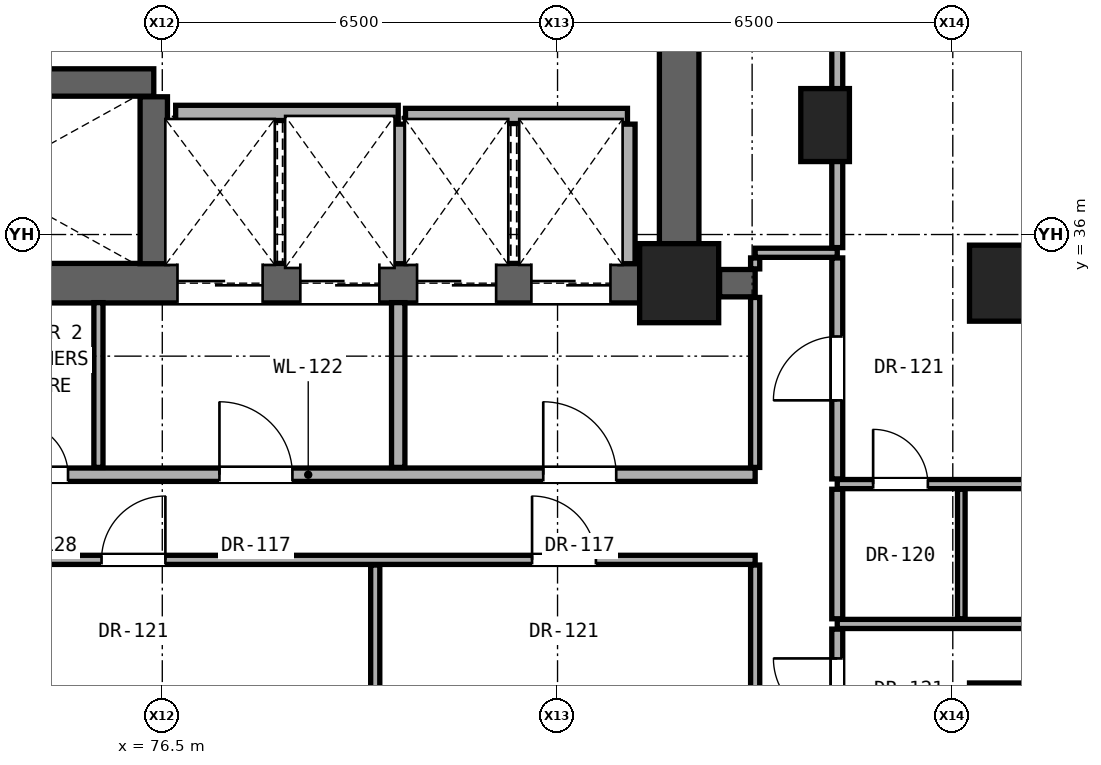
"""IFC4 building model, lengths in metres.
Left out: names, types, materials, properties, quantities, classifications, styles, units other than length and angle.
Written with IfcOpenShell. Run it as: python <this file> out.ifc"""

import sys

from ifc_helpers import new_model, si_unit, direction, frame, frame_2d, origin, origin_2d, place, context, subcontext, project, spatial, rectangle, hollow_rectangle, extrude, element, fill, save


model = new_model("IFC4")
c1 = context("Model", 3, precision=1e-05, world=origin(), true_north=direction((0.0, 1.0)))
c2 = subcontext(c1, "Body", "Model", "MODEL_VIEW")
j1 = project(units=[si_unit("LENGTHUNIT", "METRE"), si_unit("PLANEANGLEUNIT", "RADIAN")], contexts=[c1])
p1 = place(None, origin())
s1 = spatial("IfcSite", under=j1, at=p1, CompositionType="ELEMENT")
p2 = place(p1, origin())
s2 = spatial("IfcBuilding", under=s1, at=p2, CompositionType="ELEMENT")
p3 = place(p2, frame((0.0, 0.0, 78.5)))
s3 = spatial("IfcBuildingStorey", under=s2, at=p3, CompositionType="ELEMENT", Elevation=78.5)
p4 = place(p3, frame((85.0, 35.2, 0.0), z_axis=(0.0, 0.0, 1.0), x_axis=(1.0, 0.0, 0.0)))
e1 = element("IfcColumn", 1, at=p4, inside=s3, PredefinedType="COLUMN", context=c2, shape_type="SweptSolid", body=[
    extrude(rectangle(XDim=1.3, YDim=1.3, at=origin_2d()), origin(), (0.0, 0.0, 1.0), 3.3),
])
for number, where, z_axis, x_axis in (
    (2, (90.4, 28.0, 0.0), (0.0, 0.0, 1.0), (1.0, 0.0, 0.0)),
    (3, (90.4, 35.2, 0.0), (0.0, 0.0, 1.0), (1.0, 0.0, 0.0)),
):
    element("IfcColumn", number, at=place(p3, frame(where, z_axis=z_axis, x_axis=x_axis)), inside=s3, PredefinedType="COLUMN", context=c2, shape_type="SweptSolid", body=[
        extrude(hollow_rectangle(XDim=1.25, YDim=1.25, WallThickness=0.07, at=origin_2d()), origin(), (0.0, 0.0, 1.0), 3.3),
    ])
p5 = place(p3, frame((87.4, 37.8, 0.0), z_axis=(0.0, 0.0, 1.0), x_axis=(1.0, 0.0, 0.0)))
e4 = element("IfcColumn", 4, at=p5, inside=s3, PredefinedType="PILASTER", context=c2, shape_type="SweptSolid", body=[
    extrude(rectangle(XDim=0.8, YDim=1.2, at=origin_2d()), origin(), (0.0, 0.0, 1.0), 3.3),
])
p6 = place(p3, frame((85.0, 35.2, 0.0), z_axis=(0.0, 0.0, 1.0), x_axis=(0.0, 1.0, 0.0)))
e5 = element("IfcWall", 5, at=p6, inside=s3, PredefinedType="SHEAR", context=c2, shape_type="SweptSolid", body=[
    extrude(rectangle(XDim=5.6, YDim=0.65, at=frame_2d((2.8, 0.0))), origin(), (0.0, 0.0, 1.0), 2.94),
])
p7 = place(p3, frame((68.0, 35.2, 0.0), z_axis=(0.0, 0.0, 1.0), x_axis=(1.0, 0.0, 0.0)))
e6 = element("IfcWall", 6, at=p7, inside=s3, PredefinedType="SHEAR", context=c2, shape_type="SweptSolid", body=[
    extrude(rectangle(XDim=17.0, YDim=0.65, at=frame_2d((8.5, 0.0))), origin(), (0.0, 0.0, 1.0), 2.94),
])
p8 = place(p7, frame((1.06, 0.0, 0.0)))
e7 = element("IfcOpeningElement", 7, at=p8, cuts=e6, PredefinedType="OPENING", context=c2, shape_type="SweptSolid", body=[
    extrude(rectangle(XDim=1.15, YDim=2.2, at=frame_2d((0.575, 1.1))), frame((0.0, 0.335, 0.0), z_axis=(0.0, -1.0, 0.0), x_axis=(1.0, 0.0, 0.0)), (0.0, 0.0, 1.0), 0.67),
])
p9 = place(p7, frame((8.75, 0.0, 0.0)))
e8 = element("IfcOpeningElement", 8, at=p9, cuts=e6, PredefinedType="OPENING", context=c2, shape_type="SweptSolid", body=[
    extrude(rectangle(XDim=1.4, YDim=2.35, at=frame_2d((0.7, 1.175))), frame((0.0, 0.335, 0.0), z_axis=(0.0, -1.0, 0.0), x_axis=(1.0, 0.0, 0.0)), (0.0, 0.0, 1.0), 0.67),
])
p10 = place(p7, frame((10.77, 0.0, 0.0)))
e9 = element("IfcOpeningElement", 9, at=p10, cuts=e6, PredefinedType="OPENING", context=c2, shape_type="SweptSolid", body=[
    extrude(rectangle(XDim=1.3, YDim=2.3, at=frame_2d((0.65, 1.15))), frame((0.0, 0.335, 0.0), z_axis=(0.0, -1.0, 0.0), x_axis=(1.0, 0.0, 0.0)), (0.0, 0.0, 1.0), 0.67),
])
p11 = place(p7, frame((12.69, 0.0, 0.0)))
e10 = element("IfcOpeningElement", 10, at=p11, cuts=e6, PredefinedType="OPENING", context=c2, shape_type="SweptSolid", body=[
    extrude(rectangle(XDim=1.3, YDim=2.3, at=frame_2d((0.65, 1.15))), frame((0.0, 0.335, 0.0), z_axis=(0.0, -1.0, 0.0), x_axis=(1.0, 0.0, 0.0)), (0.0, 0.0, 1.0), 0.67),
])
p12 = place(p7, frame((14.57, 0.0, 0.0)))
e11 = element("IfcOpeningElement", 11, at=p12, cuts=e6, PredefinedType="OPENING", context=c2, shape_type="SweptSolid", body=[
    extrude(rectangle(XDim=1.3, YDim=2.3, at=frame_2d((0.65, 1.15))), frame((0.0, 0.335, 0.0), z_axis=(0.0, -1.0, 0.0), x_axis=(1.0, 0.0, 0.0)), (0.0, 0.0, 1.0), 0.67),
])
p13 = place(p3, frame((87.6, 29.596, 0.0), z_axis=(0.0, 0.0, 1.0), x_axis=(1.0, 0.0, 0.0)))
e12 = element("IfcWall", 12, at=p13, inside=s3, PredefinedType="PARTITIONING", context=c2, shape_type="SweptSolid", body=[
    extrude(rectangle(XDim=8.244, YDim=0.15, at=frame_2d((4.122, 0.0))), origin(), (0.0, 0.0, 1.0), 2.159),
])
p14 = place(p3, frame((66.62, 30.65, 0.0), z_axis=(0.0, 0.0, 1.0), x_axis=(1.0, 0.0, 0.0)))
e13 = element("IfcWall", 13, at=p14, inside=s3, PredefinedType="PARTITIONING", context=c2, shape_type="SweptSolid", body=[
    extrude(rectangle(XDim=19.63, YDim=0.15, at=frame_2d((9.815, 0.0))), origin(), (0.0, 0.0, 1.0), 2.316),
])
p15 = place(p14, frame((3.805, 0.0, 0.0)))
e14 = element("IfcOpeningElement", 14, at=p15, cuts=e13, PredefinedType="OPENING", context=c2, shape_type="SweptSolid", body=[
    extrude(rectangle(XDim=0.95, YDim=2.15, at=frame_2d((0.475, 1.075))), frame((0.0, 0.085, 0.0), z_axis=(0.0, -1.0, 0.0), x_axis=(1.0, 0.0, 0.0)), (0.0, 0.0, 1.0), 0.17),
])
p16 = place(p14, frame((8.881, 0.0, 0.0)))
e15 = element("IfcOpeningElement", 15, at=p16, cuts=e13, PredefinedType="OPENING", context=c2, shape_type="SweptSolid", body=[
    extrude(rectangle(XDim=1.05, YDim=2.2, at=frame_2d((0.525, 1.1))), frame((0.0, 0.085, 0.0), z_axis=(0.0, -1.0, 0.0), x_axis=(1.0, 0.0, 0.0)), (0.0, 0.0, 1.0), 0.17),
])
p17 = place(p14, frame((15.961, 0.0, 0.0)))
e16 = element("IfcOpeningElement", 16, at=p17, cuts=e13, PredefinedType="OPENING", context=c2, shape_type="SweptSolid", body=[
    extrude(rectangle(XDim=1.05, YDim=2.2, at=frame_2d((0.525, 1.1))), frame((0.0, 0.085, 0.0), z_axis=(0.0, -1.0, 0.0), x_axis=(1.0, 0.0, 0.0)), (0.0, 0.0, 1.0), 0.17),
])
p18 = place(p3, frame((87.6, 31.896, 0.0), z_axis=(0.0, 0.0, 1.0), x_axis=(1.0, 0.0, 0.0)))
e17 = element("IfcWall", 17, at=p18, inside=s3, PredefinedType="PARTITIONING", context=c2, shape_type="SweptSolid", body=[
    extrude(rectangle(XDim=8.244, YDim=0.15, at=frame_2d((4.122, 0.0))), origin(), (0.0, 0.0, 1.0), 2.159),
])
p19 = place(p18, frame((4.697, 0.0, 0.0)))
e18 = element("IfcOpeningElement", 18, at=p19, cuts=e17, PredefinedType="OPENING", context=c2, shape_type="SweptSolid", body=[
    extrude(rectangle(XDim=0.85, YDim=2.01, at=frame_2d((0.425, 1.005))), frame((0.0, 0.085, 0.0), z_axis=(0.0, -1.0, 0.0), x_axis=(1.0, 0.0, 0.0)), (0.0, 0.0, 1.0), 0.17),
])
p20 = place(p18, frame((0.59, 0.0, 0.0)))
e19 = element("IfcOpeningElement", 19, at=p20, cuts=e17, PredefinedType="OPENING", context=c2, shape_type="SweptSolid", body=[
    extrude(rectangle(XDim=0.9, YDim=2.1, at=frame_2d((0.45, 1.05))), frame((0.0, 0.085, 0.0), z_axis=(0.0, -1.0, 0.0), x_axis=(1.0, 0.0, 0.0)), (0.0, 0.0, 1.0), 0.17),
])
p21 = place(p3, frame((71.55, 32.05, 0.0), z_axis=(0.0, 0.0, 1.0), x_axis=(1.0, 0.0, 0.0)))
e20 = element("IfcWall", 20, at=p21, inside=s3, PredefinedType="SOLIDWALL", context=c2, shape_type="SweptSolid", body=[
    extrude(rectangle(XDim=14.7, YDim=0.22, at=frame_2d((7.35, 0.0))), origin(), (0.0, 0.0, 1.0), 2.316),
])
p22 = place(p21, frame((11.215, 0.0, 0.0)))
e21 = element("IfcOpeningElement", 21, at=p22, cuts=e20, PredefinedType="OPENING", context=c2, shape_type="SweptSolid", body=[
    extrude(rectangle(XDim=1.2, YDim=2.25, at=frame_2d((0.6, 1.125))), frame((0.0, 0.12, 0.0), z_axis=(0.0, -1.0, 0.0), x_axis=(1.0, 0.0, 0.0)), (0.0, 0.0, 1.0), 0.24),
])
p23 = place(p21, frame((5.89, 0.0, 0.0)))
e22 = element("IfcOpeningElement", 22, at=p23, cuts=e20, PredefinedType="OPENING", context=c2, shape_type="SweptSolid", body=[
    extrude(rectangle(XDim=1.2, YDim=2.25, at=frame_2d((0.6, 1.125))), frame((0.0, 0.12, 0.0), z_axis=(0.0, -1.0, 0.0), x_axis=(1.0, 0.0, 0.0)), (0.0, 0.0, 1.0), 0.24),
])
p24 = place(p21, frame((0.7, 0.0, 0.0)))
e23 = element("IfcOpeningElement", 23, at=p24, cuts=e20, PredefinedType="OPENING", context=c2, shape_type="SweptSolid", body=[
    extrude(rectangle(XDim=0.85, YDim=2.01, at=frame_2d((0.425, 1.005))), frame((0.0, 0.12, 0.0), z_axis=(0.0, -1.0, 0.0), x_axis=(1.0, 0.0, 0.0)), (0.0, 0.0, 1.0), 0.24),
])
p25 = place(p21, frame((2.55, 0.0, 0.0)))
e24 = element("IfcOpeningElement", 24, at=p25, cuts=e20, PredefinedType="OPENING", context=c2, shape_type="SweptSolid", body=[
    extrude(rectangle(XDim=0.85, YDim=2.01, at=frame_2d((0.425, 1.005))), frame((0.0, 0.12, 0.0), z_axis=(0.0, -1.0, 0.0), x_axis=(1.0, 0.0, 0.0)), (0.0, 0.0, 1.0), 0.24),
])
p26 = place(p3, frame((85.665, 35.2, 0.0), z_axis=(0.0, 0.0, 1.0), x_axis=(1.0, 0.0, 0.0)))
e25 = element("IfcWall", 25, at=p26, inside=s3, PredefinedType="SHEAR", context=c2, shape_type="SweptSolid", body=[
    extrude(rectangle(XDim=0.585, YDim=0.45, at=frame_2d((0.292, 0.0))), origin(), (0.0, 0.0, 1.0), 2.94),
])
p27 = place(p3, frame((86.25, 35.7, 0.0), z_axis=(0.0, 0.0, 1.0), x_axis=(1.0, 0.0, 0.0)))
e26 = element("IfcWall", 26, at=p27, inside=s3, PredefinedType="PARTITIONING", context=c2, shape_type="SweptSolid", body=[
    extrude(rectangle(XDim=1.35, YDim=0.15, at=frame_2d((0.675, 0.0))), origin(), (0.0, 0.0, 1.0), 2.94),
])
p28 = place(p3, frame((80.5, 37.95, 0.0), z_axis=(0.0, 0.0, 1.0), x_axis=(1.0, 0.0, 0.0)))
e27 = element("IfcWall", 27, at=p28, inside=s3, PredefinedType="SOLIDWALL", context=c2, shape_type="SweptSolid", body=[
    extrude(rectangle(XDim=3.65, YDim=0.25, at=frame_2d((1.825, 0.0))), origin(), (0.0, 0.0, 1.0), 2.94),
])
p29 = place(p3, frame((76.72, 38.0, 0.0), z_axis=(0.0, 0.0, 1.0), x_axis=(1.0, 0.0, 0.0)))
e28 = element("IfcWall", 28, at=p29, inside=s3, PredefinedType="SOLIDWALL", context=c2, shape_type="SweptSolid", body=[
    extrude(rectangle(XDim=3.66, YDim=0.25, at=frame_2d((1.83, 0.0))), origin(), (0.0, 0.0, 1.0), 2.94),
])
p30 = place(p3, frame((68.32, 38.5, 0.0), z_axis=(0.0, 0.0, 1.0), x_axis=(1.0, 0.0, 0.0)))
e29 = element("IfcWall", 29, at=p30, inside=s3, PredefinedType="SHEAR", context=c2, shape_type="SweptSolid", body=[
    extrude(rectangle(XDim=8.04, YDim=0.45, at=frame_2d((4.02, 0.0))), origin(), (0.0, 0.0, 1.0), 2.94),
])
p31 = place(p3, frame((75.45, 32.17, 0.0), z_axis=(0.0, 0.0, 1.0), x_axis=(0.0, 1.0, 0.0)))
e30 = element("IfcWall", 30, at=p31, inside=s3, PredefinedType="PARTITIONING", context=c2, shape_type="SweptSolid", body=[
    extrude(rectangle(XDim=2.71, YDim=0.15, at=frame_2d((1.355, 0.0))), origin(), (0.0, 0.0, 1.0), 2.94),
])
p32 = place(p3, frame((76.36, 35.52, 0.0), z_axis=(0.0, 0.0, 1.0), x_axis=(0.0, 1.0, 0.0)))
e31 = element("IfcWall", 31, at=p32, inside=s3, PredefinedType="SHEAR", context=c2, shape_type="SweptSolid", body=[
    extrude(rectangle(XDim=2.745, YDim=0.45, at=frame_2d((1.373, 0.0))), origin(), (0.0, 0.0, 1.0), 2.94),
])
p33 = place(p3, frame((80.002, 26.17, 0.0), z_axis=(0.0, 0.0, 1.0), x_axis=(0.0, 1.0, 0.0)))
e32 = element("IfcWall", 32, at=p33, inside=s3, PredefinedType="PARTITIONING", context=c2, shape_type="SweptSolid", body=[
    extrude(rectangle(XDim=4.395, YDim=0.15, at=frame_2d((2.198, 0.0))), origin(), (0.0, 0.0, 1.0), 2.316),
])
p34 = place(p3, frame((80.38, 32.17, 0.0), z_axis=(0.0, 0.0, 1.0), x_axis=(0.0, 1.0, 0.0)))
e33 = element("IfcWall", 33, at=p34, inside=s3, PredefinedType="SOLIDWALL", context=c2, shape_type="SweptSolid", body=[
    extrude(rectangle(XDim=2.71, YDim=0.22, at=frame_2d((1.355, 0.0))), origin(), (0.0, 0.0, 1.0), 2.94),
])
for number, where, z_axis, x_axis in (
    (34, (80.38, 35.52, 0.0), (0.0, 0.0, 1.0), (0.0, 1.0, 0.0)),
    (35, (84.15, 35.52, 0.0), (0.0, 0.0, 1.0), (0.0, 1.0, 0.0)),
):
    element("IfcWall", number, at=place(p3, frame(where, z_axis=z_axis, x_axis=x_axis)), inside=s3, PredefinedType="SOLIDWALL", context=c2, shape_type="SweptSolid", body=[
        extrude(rectangle(XDim=2.295, YDim=0.25, at=frame_2d((1.147, 0.0))), origin(), (0.0, 0.0, 1.0), 2.94),
    ])
p35 = place(p3, frame((86.25, 26.17, 0.0), z_axis=(0.0, 0.0, 1.0), x_axis=(0.0, 1.0, 0.0)))
e36 = element("IfcWall", 36, at=p35, inside=s3, PredefinedType="PARTITIONING", context=c2, shape_type="SweptSolid", body=[
    extrude(rectangle(XDim=4.395, YDim=0.15, at=frame_2d((2.198, 0.0))), origin(), (0.0, 0.0, 1.0), 2.316),
])
p36 = place(p3, frame((86.25, 32.17, 0.0), z_axis=(0.0, 0.0, 1.0), x_axis=(0.0, 1.0, 0.0)))
e37 = element("IfcWall", 37, at=p36, inside=s3, PredefinedType="PARTITIONING", context=c2, shape_type="SweptSolid", body=[
    extrude(rectangle(XDim=2.795, YDim=0.15, at=frame_2d((1.397, 0.0))), origin(), (0.0, 0.0, 1.0), 2.332),
])
p37 = place(p3, frame((86.25, 35.435, 0.0), z_axis=(0.0, 0.0, 1.0), x_axis=(0.0, 1.0, 0.0)))
e38 = element("IfcWall", 38, at=p37, inside=s3, PredefinedType="PARTITIONING", context=c2, shape_type="SweptSolid", body=[
    extrude(rectangle(XDim=0.18, YDim=0.15, at=frame_2d((0.09, 0.0))), origin(), (0.0, 0.0, 1.0), 2.332),
])
p38 = place(p3, frame((87.6, 27.497, 0.0), z_axis=(0.0, 0.0, 1.0), x_axis=(0.0, 1.0, 0.0)))
e39 = element("IfcWall", 39, at=p38, inside=s3, PredefinedType="PARTITIONING", context=c2, shape_type="SweptSolid", body=[
    extrude(rectangle(XDim=2.014, YDim=0.18, at=frame_2d((1.007, 0.0))), origin(), (0.0, 0.0, 1.0), 2.316),
])
p39 = place(p38, frame((0.482, 0.0, 0.0)))
e40 = element("IfcOpeningElement", 40, at=p39, cuts=e39, PredefinedType="OPENING", context=c2, shape_type="SweptSolid", body=[
    extrude(rectangle(XDim=1.05, YDim=2.2, at=frame_2d((0.525, 1.1))), frame((0.0, 0.1, 0.0), z_axis=(0.0, -1.0, 0.0), x_axis=(1.0, 0.0, 0.0)), (0.0, 0.0, 1.0), 0.2),
])
p40 = place(p3, frame((87.6, 29.681, 0.0), z_axis=(0.0, 0.0, 1.0), x_axis=(0.0, 1.0, 0.0)))
e41 = element("IfcWall", 41, at=p40, inside=s3, PredefinedType="PARTITIONING", context=c2, shape_type="SweptSolid", body=[
    extrude(rectangle(XDim=2.13, YDim=0.18, at=frame_2d((1.065, 0.0))), origin(), (0.0, 0.0, 1.0), 2.94),
])
p41 = place(p3, frame((87.6, 31.981, 0.0), z_axis=(0.0, 0.0, 1.0), x_axis=(0.0, 1.0, 0.0)))
e42 = element("IfcWall", 42, at=p41, inside=s3, PredefinedType="PARTITIONING", context=c2, shape_type="SweptSolid", body=[
    extrude(rectangle(XDim=3.634, YDim=0.18, at=frame_2d((1.817, 0.0))), origin(), (0.0, 0.0, 1.0), 2.332),
])
p42 = place(p41, frame((1.292, 0.0, 0.0)))
e43 = element("IfcOpeningElement", 43, at=p42, cuts=e42, PredefinedType="OPENING", context=c2, shape_type="SweptSolid", body=[
    extrude(rectangle(XDim=1.05, YDim=2.2, at=frame_2d((0.525, 1.1))), frame((0.0, 0.1, 0.0), z_axis=(0.0, -1.0, 0.0), x_axis=(1.0, 0.0, 0.0)), (0.0, 0.0, 1.0), 0.2),
])
p43 = place(p3, frame((87.6, 35.785, 0.0), z_axis=(0.0, 0.0, 1.0), x_axis=(0.0, 1.0, 0.0)))
e44 = element("IfcWall", 44, at=p43, inside=s3, PredefinedType="PARTITIONING", context=c2, shape_type="SweptSolid", body=[
    extrude(rectangle(XDim=4.026, YDim=0.18, at=frame_2d((2.013, 0.0))), origin(), (0.0, 0.0, 1.0), 2.316),
])
p44 = place(p3, frame((89.64, 29.681, 0.0), z_axis=(0.0, 0.0, 1.0), x_axis=(0.0, 1.0, 0.0)))
e45 = element("IfcWall", 45, at=p44, inside=s3, PredefinedType="PARTITIONING", context=c2, shape_type="SweptSolid", body=[
    extrude(rectangle(XDim=2.13, YDim=0.125, at=frame_2d((1.065, 0.0))), origin(), (0.0, 0.0, 1.0), 2.94),
])
p45 = place(p22, origin())
e46 = element("IfcDoor", 46, at=p45, inside=s3, OperationType="SINGLE_SWING_LEFT", PredefinedType="DOOR", context=c2, shape_type="SweptSolid", body=[
    extrude(rectangle(XDim=1.2, YDim=2.25, at=frame_2d((0.6, 1.125))), frame((0.0, 0.025, 0.0), z_axis=(0.0, -1.0, 0.0), x_axis=(1.0, 0.0, 0.0)), (0.0, 0.0, 1.0), 0.05),
])
fill(e21, e46)
p46 = place(p23, origin())
e47 = element("IfcDoor", 47, at=p46, inside=s3, OperationType="SINGLE_SWING_LEFT", PredefinedType="DOOR", context=c2, shape_type="SweptSolid", body=[
    extrude(rectangle(XDim=1.2, YDim=2.25, at=frame_2d((0.6, 1.125))), frame((0.0, 0.025, 0.0), z_axis=(0.0, -1.0, 0.0), x_axis=(1.0, 0.0, 0.0)), (0.0, 0.0, 1.0), 0.05),
])
fill(e22, e47)
p47 = place(p25, origin())
e48 = element("IfcDoor", 48, at=p47, inside=s3, OperationType="SINGLE_SWING_LEFT", PredefinedType="DOOR", context=c2, shape_type="SweptSolid", body=[
    extrude(rectangle(XDim=0.85, YDim=2.01, at=frame_2d((0.425, 1.005))), frame((0.0, 0.025, 0.0), z_axis=(0.0, -1.0, 0.0), x_axis=(1.0, 0.0, 0.0)), (0.0, 0.0, 1.0), 0.05),
])
fill(e24, e48)
p48 = place(p39, origin())
e49 = element("IfcDoor", 49, at=p48, inside=s3, OperationType="SINGLE_SWING_RIGHT", PredefinedType="DOOR", context=c2, shape_type="SweptSolid", body=[
    extrude(rectangle(XDim=1.05, YDim=2.2, at=frame_2d((0.525, 1.1))), frame((0.0, 0.025, 0.0), z_axis=(0.0, -1.0, 0.0), x_axis=(1.0, 0.0, 0.0)), (0.0, 0.0, 1.0), 0.05),
])
fill(e40, e49)
p49 = place(p42, origin())
e50 = element("IfcDoor", 50, at=p49, inside=s3, OperationType="SINGLE_SWING_LEFT", PredefinedType="DOOR", context=c2, shape_type="SweptSolid", body=[
    extrude(rectangle(XDim=1.05, YDim=2.2, at=frame_2d((0.525, 1.1))), frame((0.0, 0.025, 0.0), z_axis=(0.0, -1.0, 0.0), x_axis=(1.0, 0.0, 0.0)), (0.0, 0.0, 1.0), 0.05),
])
fill(e43, e50)
p50 = place(p20, origin())
e51 = element("IfcDoor", 51, at=p50, inside=s3, OperationType="SINGLE_SWING_LEFT", PredefinedType="DOOR", context=c2, shape_type="SweptSolid", body=[
    extrude(rectangle(XDim=0.9, YDim=2.1, at=frame_2d((0.45, 1.05))), frame((0.0, 0.025, 0.0), z_axis=(0.0, -1.0, 0.0), x_axis=(1.0, 0.0, 0.0)), (0.0, 0.0, 1.0), 0.05),
])
fill(e19, e51)
p51 = place(p16, origin())
e52 = element("IfcDoor", 52, at=p51, inside=s3, OperationType="SINGLE_SWING_RIGHT", PredefinedType="DOOR", context=c2, shape_type="SweptSolid", body=[
    extrude(rectangle(XDim=1.05, YDim=2.2, at=frame_2d((0.525, 1.1))), frame((0.0, 0.025, 0.0), z_axis=(0.0, -1.0, 0.0), x_axis=(1.0, 0.0, 0.0)), (0.0, 0.0, 1.0), 0.05),
])
fill(e15, e52)
p52 = place(p17, origin())
e53 = element("IfcDoor", 53, at=p52, inside=s3, OperationType="SINGLE_SWING_LEFT", PredefinedType="DOOR", context=c2, shape_type="SweptSolid", body=[
    extrude(rectangle(XDim=1.05, YDim=2.2, at=frame_2d((0.525, 1.1))), frame((0.0, 0.025, 0.0), z_axis=(0.0, -1.0, 0.0), x_axis=(1.0, 0.0, 0.0)), (0.0, 0.0, 1.0), 0.05),
])
fill(e16, e53)
p53 = place(p9, origin())
e54 = element("IfcDoor", 54, at=p53, inside=s3, OperationType="DOUBLE_DOOR_SLIDING", PredefinedType="DOOR", context=c2, shape_type="SweptSolid", body=[
    extrude(rectangle(XDim=1.4, YDim=2.35, at=frame_2d((0.7, 1.175))), frame((0.0, 0.025, 0.0), z_axis=(0.0, -1.0, 0.0), x_axis=(1.0, 0.0, 0.0)), (0.0, 0.0, 1.0), 0.05),
])
fill(e8, e54)
p54 = place(p10, origin())
e55 = element("IfcDoor", 55, at=p54, inside=s3, OperationType="DOUBLE_DOOR_SLIDING", PredefinedType="DOOR", context=c2, shape_type="SweptSolid", body=[
    extrude(rectangle(XDim=1.3, YDim=2.3, at=frame_2d((0.65, 1.15))), frame((0.0, 0.025, 0.0), z_axis=(0.0, -1.0, 0.0), x_axis=(1.0, 0.0, 0.0)), (0.0, 0.0, 1.0), 0.05),
])
fill(e9, e55)
p55 = place(p11, origin())
e56 = element("IfcDoor", 56, at=p55, inside=s3, OperationType="DOUBLE_DOOR_SLIDING", PredefinedType="DOOR", context=c2, shape_type="SweptSolid", body=[
    extrude(rectangle(XDim=1.3, YDim=2.3, at=frame_2d((0.65, 1.15))), frame((0.0, 0.025, 0.0), z_axis=(0.0, -1.0, 0.0), x_axis=(1.0, 0.0, 0.0)), (0.0, 0.0, 1.0), 0.05),
])
fill(e10, e56)
p56 = place(p12, origin())
e57 = element("IfcDoor", 57, at=p56, inside=s3, OperationType="DOUBLE_DOOR_SLIDING", PredefinedType="DOOR", context=c2, shape_type="SweptSolid", body=[
    extrude(rectangle(XDim=1.3, YDim=2.3, at=frame_2d((0.65, 1.15))), frame((0.0, 0.025, 0.0), z_axis=(0.0, -1.0, 0.0), x_axis=(1.0, 0.0, 0.0)), (0.0, 0.0, 1.0), 0.05),
])
fill(e11, e57)
save(model, sys.argv[1])
